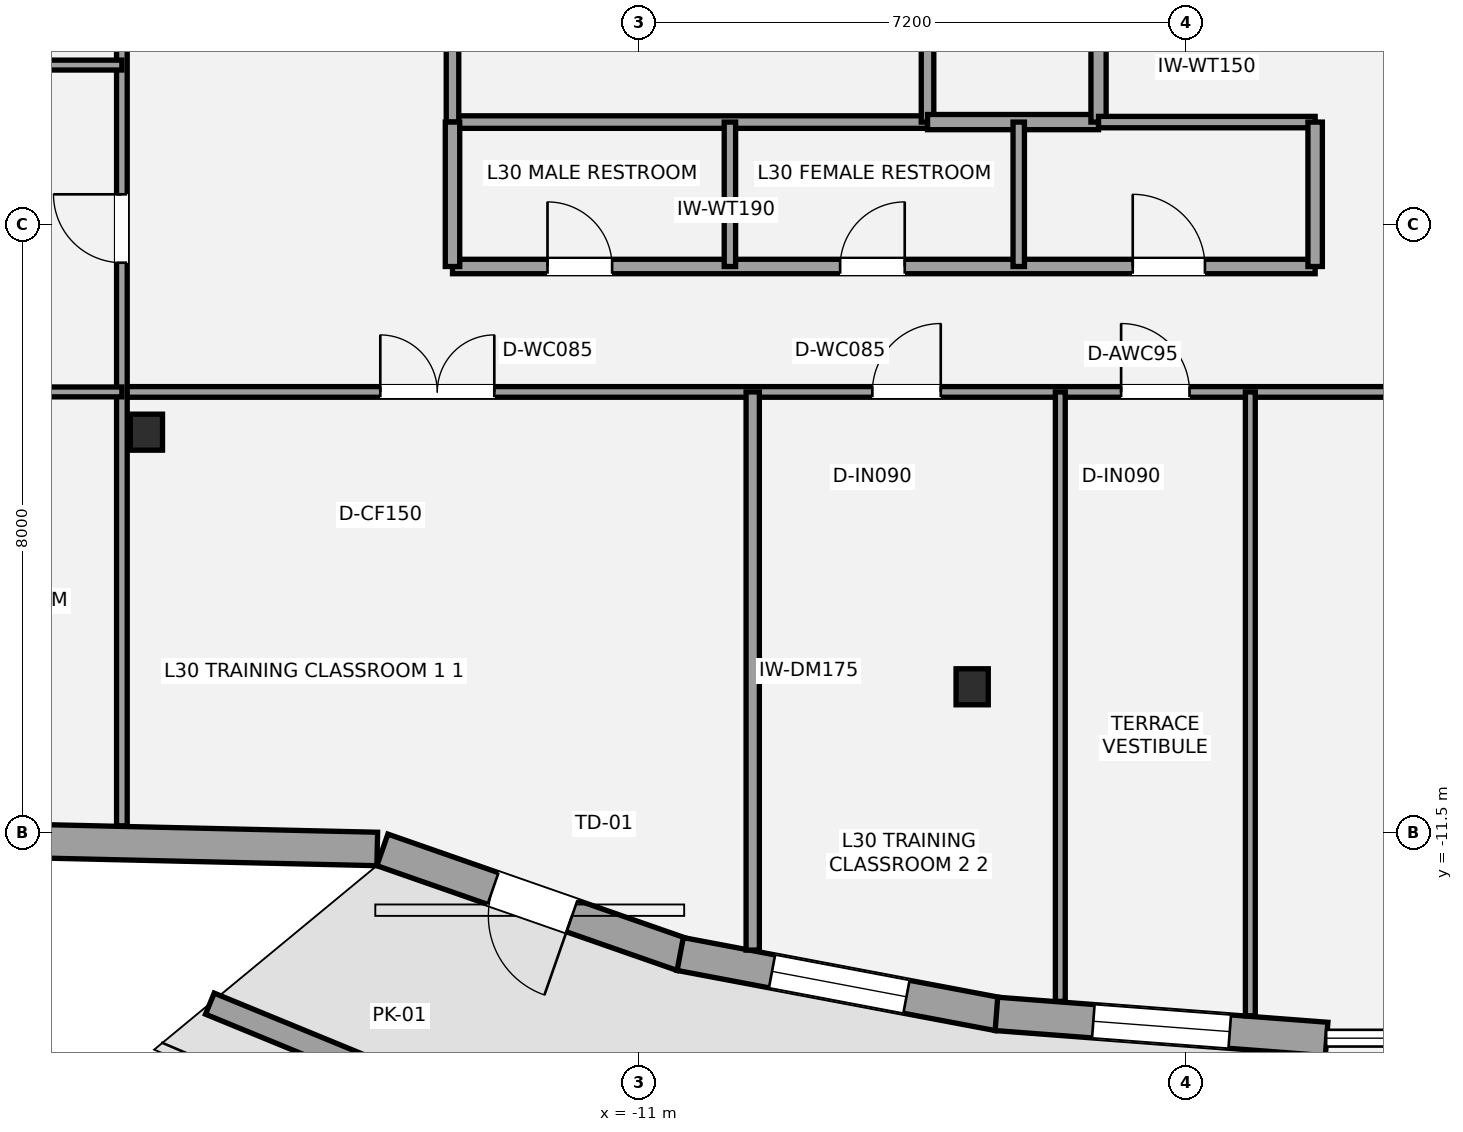
"""IFC4 building model, lengths in metres.
Left out: names, types, materials, properties, quantities, classifications, styles, units other than length and angle.
Written with IfcOpenShell. Run it as: python <this file> out.ifc"""

import sys

from ifc_helpers import new_model, si_unit, direction, frame, frame_2d, origin, origin_2d, place, context, subcontext, project, spatial, rectangle, i_section, extrude, element, fill, save


model = new_model("IFC4")
c1 = context("Model", 3, precision=1e-05, world=origin(), true_north=direction((0.0, 1.0)))
c2 = subcontext(c1, "Body", "Model", "MODEL_VIEW")
j1 = project(units=[si_unit("LENGTHUNIT", "METRE"), si_unit("PLANEANGLEUNIT", "RADIAN")], contexts=[c1])
p1 = place(None, origin())
s1 = spatial("IfcSite", under=j1, at=p1, CompositionType="ELEMENT")
p2 = place(p1, origin())
s2 = spatial("IfcBuilding", under=s1, at=p2, CompositionType="ELEMENT")
p3 = place(p2, frame((0.0, 0.0, 114.1)))
s3 = spatial("IfcBuildingStorey", under=s2, at=p3, CompositionType="ELEMENT", Elevation=114.1)
for number, where, z_axis, x_axis in (
    (1, (-17.477, -6.229, 0.0), (0.0, 0.0, 1.0), (1.0, 0.0, 0.0)),
    (2, (-6.613, -9.579, 0.0), (0.0, 0.0, 1.0), (1.0, 0.0, 0.0)),
):
    element("IfcColumn", number, at=place(p3, frame(where, z_axis=z_axis, x_axis=x_axis)), inside=s3, PredefinedType="COLUMN", context=c2, shape_type="SweptSolid", body=[
        extrude(i_section(OverallWidth=0.424, OverallDepth=0.474, WebThickness=0.048, FlangeThickness=0.077, at=origin_2d()), origin(), (0.0, 0.0, 1.0), 3.5),
    ])
p4 = place(p3, frame((-14.44, -11.713, 0.0), z_axis=(0.0, 0.0, 1.0), x_axis=(-0.999739488543, 0.022824439704, 0.0)))
e3 = element("IfcWall", 3, at=p4, inside=s3, PredefinedType="STANDARD", context=c2, shape_type="SweptSolid", body=[
    extrude(rectangle(XDim=6.728, YDim=0.44, at=frame_2d((3.364, 0.0))), origin(), (0.0, 0.0, 1.0), 2.532),
])
p5 = place(p3, frame((-10.423, -13.104, 0.0), z_axis=(0.0, 0.0, 1.0), x_axis=(-0.944167257662, 0.329466522668, 0.0)))
e4 = element("IfcWall", 4, at=p5, inside=s3, PredefinedType="STANDARD", context=c2, shape_type="SweptSolid", body=[
    extrude(rectangle(XDim=4.184, YDim=0.44, at=frame_2d((2.092, 0.0))), origin(), (0.0, 0.0, 1.0), 2.532),
])
p6 = place(p5, frame((1.542, 0.0, 0.0)))
e5 = element("IfcOpeningElement", 5, at=p6, cuts=e4, PredefinedType="OPENING", context=c2, shape_type="SweptSolid", body=[
    extrude(rectangle(XDim=1.1, YDim=2.15, at=frame_2d((0.55, 1.075))), frame((0.0, 0.23, 0.0), z_axis=(0.0, -1.0, 0.0), x_axis=(1.0, 0.0, 0.0)), (0.0, 0.0, 1.0), 0.46),
])
p7 = place(p3, frame((-6.269, -13.886, 0.0), z_axis=(0.0, 0.0, 1.0), x_axis=(-0.982602489318, 0.185721156539, 0.0)))
e6 = element("IfcWall", 6, at=p7, inside=s3, PredefinedType="STANDARD", context=c2, shape_type="SweptSolid", body=[
    extrude(rectangle(XDim=4.259, YDim=0.44, at=frame_2d((2.13, 0.0))), origin(), (0.0, 0.0, 1.0), 2.532),
])
p8 = place(p7, frame((1.229, 0.0, 0.65)))
e7 = element("IfcOpeningElement", 7, at=p8, cuts=e6, PredefinedType="OPENING", context=c2, shape_type="SweptSolid", body=[
    extrude(rectangle(XDim=1.8, YDim=1.7, at=frame_2d((0.9, 0.85))), frame((0.0, 0.23, 0.0), z_axis=(0.0, -1.0, 0.0), x_axis=(1.0, 0.0, 0.0)), (0.0, 0.0, 1.0), 0.46),
])
p9 = place(p3, frame((-1.949, -14.213, 0.0), z_axis=(0.0, 0.0, 1.0), x_axis=(-0.997130139105, 0.075706576258, 0.0)))
e8 = element("IfcWall", 8, at=p9, inside=s3, PredefinedType="STANDARD", context=c2, shape_type="SweptSolid", body=[
    extrude(rectangle(XDim=4.357, YDim=0.44, at=frame_2d((2.178, 0.0))), origin(), (0.0, 0.0, 1.0), 2.532),
])
p10 = place(p9, frame((1.278, 0.0, 0.65)))
e9 = element("IfcOpeningElement", 9, at=p10, cuts=e8, PredefinedType="OPENING", context=c2, shape_type="SweptSolid", body=[
    extrude(rectangle(XDim=1.8, YDim=1.7, at=frame_2d((0.9, 0.85))), frame((0.0, 0.23, 0.0), z_axis=(0.0, -1.0, 0.0), x_axis=(1.0, 0.0, 0.0)), (0.0, 0.0, 1.0), 0.46),
])
p11 = place(p3, frame((-16.643, -13.748, 0.0), z_axis=(0.0, 0.0, 1.0), x_axis=(0.924939291397, -0.380114860576, 0.0)))
e10 = element("IfcWall", 10, at=p11, inside=s3, PredefinedType="PARAPET", context=c2, shape_type="SweptSolid", body=[
    extrude(rectangle(XDim=4.739, YDim=0.3, at=frame_2d((2.369, 0.0))), origin(), (0.0, 0.0, 1.0), 0.45),
])
p12 = place(p3, frame((-13.45, -2.15, 0.0), z_axis=(0.0, 0.0, 1.0), x_axis=(1.0, 0.0, 0.0)))
e11 = element("IfcWall", 11, at=p12, inside=s3, PredefinedType="PARTITIONING", context=c2, shape_type="SweptSolid", body=[
    extrude(rectangle(XDim=6.25, YDim=0.165, at=frame_2d((3.125, 0.0))), origin(), (0.0, 0.0, 1.0), 3.31),
])
p13 = place(p3, frame((-13.45, -2.15, 0.0), z_axis=(0.0, 0.0, 1.0), x_axis=(0.0, 1.0, 0.0)))
e12 = element("IfcWall", 12, at=p13, inside=s3, PredefinedType="PARTITIONING", context=c2, shape_type="SweptSolid", body=[
    extrude(rectangle(XDim=3.3, YDim=0.165, at=frame_2d((1.65, 0.0))), origin(), (0.0, 0.0, 1.0), 2.763),
])
p14 = place(p13, frame((1.15, 0.0, 0.0)))
e13 = element("IfcOpeningElement", 13, at=p14, cuts=e12, PredefinedType="OPENING", context=c2, shape_type="SweptSolid", body=[
    extrude(rectangle(XDim=1.05, YDim=2.15, at=frame_2d((0.525, 1.075))), frame((0.0, 0.093, 0.0), z_axis=(0.0, -1.0, 0.0), x_axis=(1.0, 0.0, 0.0)), (0.0, 0.0, 1.0), 0.185),
])
p15 = place(p3, frame((-7.2, -2.15, 0.0), z_axis=(0.0, 0.0, 1.0), x_axis=(0.0, 1.0, 0.0)))
e14 = element("IfcWall", 14, at=p15, inside=s3, PredefinedType="PARTITIONING", context=c2, shape_type="SweptSolid", body=[
    extrude(rectangle(XDim=3.3, YDim=0.165, at=frame_2d((1.65, 0.0))), origin(), (0.0, 0.0, 1.0), 3.31),
])
p16 = place(p3, frame((-7.2, -2.15, 0.0), z_axis=(0.0, 0.0, 1.0), x_axis=(1.0, 0.0, 0.0)))
e15 = element("IfcWall", 15, at=p16, inside=s3, PredefinedType="SOLIDWALL", context=c2, shape_type="SweptSolid", body=[
    extrude(rectangle(XDim=2.25, YDim=0.2, at=frame_2d((1.125, 0.0))), origin(), (0.0, 0.0, 1.0), 3.31),
])
p17 = place(p3, frame((-4.95, -2.15, 0.0), z_axis=(0.0, 0.0, 1.0), x_axis=(0.0, 1.0, 0.0)))
e16 = element("IfcWall", 16, at=p17, inside=s3, PredefinedType="SOLIDWALL", context=c2, shape_type="SweptSolid", body=[
    extrude(rectangle(XDim=3.3, YDim=0.2, at=frame_2d((1.65, 0.0))), origin(), (0.0, 0.0, 1.0), 2.763),
])
p18 = place(p17, frame((0.95, 0.0, 0.0)))
e17 = element("IfcOpeningElement", 17, at=p18, cuts=e16, PredefinedType="OPENING", context=c2, shape_type="SweptSolid", body=[
    extrude(rectangle(XDim=0.75, YDim=2.1, at=frame_2d((0.375, 1.05))), frame((0.0, 0.11, 0.0), z_axis=(0.0, -1.0, 0.0), x_axis=(1.0, 0.0, 0.0)), (0.0, 0.0, 1.0), 0.22),
])
p19 = place(p3, frame((-13.45, -4.05, 0.0), z_axis=(0.0, 0.0, 1.0), x_axis=(1.0, 0.0, 0.0)))
e18 = element("IfcWall", 18, at=p19, inside=s3, PredefinedType="PLUMBINGWALL", context=c2, shape_type="SweptSolid", body=[
    extrude(rectangle(XDim=11.35, YDim=0.19, at=frame_2d((5.675, 0.0))), origin(), (0.0, 0.0, 1.0), 2.763),
])
p20 = place(p19, frame((1.25, 0.0, 0.0)))
e19 = element("IfcOpeningElement", 19, at=p20, cuts=e18, PredefinedType="OPENING", context=c2, shape_type="SweptSolid", body=[
    extrude(rectangle(XDim=0.85, YDim=2.1, at=frame_2d((0.425, 1.05))), frame((0.0, 0.105, 0.0), z_axis=(0.0, -1.0, 0.0), x_axis=(1.0, 0.0, 0.0)), (0.0, 0.0, 1.0), 0.21),
])
p21 = place(p19, frame((5.1, 0.0, 0.0)))
e20 = element("IfcOpeningElement", 20, at=p21, cuts=e18, PredefinedType="OPENING", context=c2, shape_type="SweptSolid", body=[
    extrude(rectangle(XDim=0.85, YDim=2.1, at=frame_2d((0.425, 1.05))), frame((0.0, 0.105, 0.0), z_axis=(0.0, -1.0, 0.0), x_axis=(1.0, 0.0, 0.0)), (0.0, 0.0, 1.0), 0.21),
])
p22 = place(p19, frame((8.95, 0.0, 0.0)))
e21 = element("IfcOpeningElement", 21, at=p22, cuts=e18, PredefinedType="OPENING", context=c2, shape_type="SweptSolid", body=[
    extrude(rectangle(XDim=0.95, YDim=2.15, at=frame_2d((0.475, 1.075))), frame((0.0, 0.105, 0.0), z_axis=(0.0, -1.0, 0.0), x_axis=(1.0, 0.0, 0.0)), (0.0, 0.0, 1.0), 0.21),
])
p23 = place(p3, frame((-4.95, -2.15, 0.0), z_axis=(0.0, 0.0, 1.0), x_axis=(1.0, 0.0, 0.0)))
e22 = element("IfcWall", 22, at=p23, inside=s3, PredefinedType="PLUMBINGWALL", context=c2, shape_type="SweptSolid", body=[
    extrude(rectangle(XDim=2.85, YDim=0.15, at=frame_2d((1.425, 0.0))), origin(), (0.0, 0.0, 1.0), 2.763),
])
p24 = place(p3, frame((-13.45, -4.05, 0.0), z_axis=(0.0, 0.0, 1.0), x_axis=(0.0, 1.0, 0.0)))
e23 = element("IfcWall", 23, at=p24, inside=s3, PredefinedType="PLUMBINGWALL", context=c2, shape_type="SweptSolid", body=[
    extrude(rectangle(XDim=1.9, YDim=0.19, at=frame_2d((0.95, 0.0))), origin(), (0.0, 0.0, 1.0), 2.763),
])
p25 = place(p3, frame((-2.1, -4.05, 0.0), z_axis=(0.0, 0.0, 1.0), x_axis=(0.0, 1.0, 0.0)))
e24 = element("IfcWall", 24, at=p25, inside=s3, PredefinedType="PLUMBINGWALL", context=c2, shape_type="SweptSolid", body=[
    extrude(rectangle(XDim=1.9, YDim=0.19, at=frame_2d((0.95, 0.0))), origin(), (0.0, 0.0, 1.0), 3.31),
])
p26 = place(p3, frame((-9.8, -4.05, 0.0), z_axis=(0.0, 0.0, 1.0), x_axis=(0.0, 1.0, 0.0)))
e25 = element("IfcWall", 25, at=p26, inside=s3, PredefinedType="PLUMBINGWALL", context=c2, shape_type="SweptSolid", body=[
    extrude(rectangle(XDim=1.9, YDim=0.15, at=frame_2d((0.95, 0.0))), origin(), (0.0, 0.0, 1.0), 3.31),
])
p27 = place(p3, frame((-6.0, -4.05, 0.0), z_axis=(0.0, 0.0, 1.0), x_axis=(0.0, 1.0, 0.0)))
e26 = element("IfcWall", 26, at=p27, inside=s3, PredefinedType="PLUMBINGWALL", context=c2, shape_type="SweptSolid", body=[
    extrude(rectangle(XDim=1.9, YDim=0.15, at=frame_2d((0.95, 0.0))), origin(), (0.0, 0.0, 1.0), 2.763),
])
p28 = place(p3, frame((-17.8, -5.7, 0.0), z_axis=(0.0, 0.0, 1.0), x_axis=(1.0, 0.0, 0.0)))
e27 = element("IfcWall", 27, at=p28, inside=s3, PredefinedType="PARTITIONING", context=c2, shape_type="SweptSolid", body=[
    extrude(rectangle(XDim=34.2, YDim=0.14, at=frame_2d((17.1, 0.0))), origin(), (0.0, 0.0, 1.0), 2.688),
])
p29 = place(p28, frame((3.4, 0.0, 0.0)))
e28 = element("IfcOpeningElement", 28, at=p29, cuts=e27, PredefinedType="OPENING", context=c2, shape_type="SweptSolid", body=[
    extrude(rectangle(XDim=1.5, YDim=2.15, at=frame_2d((0.75, 1.075))), frame((0.0, 0.08, 0.0), z_axis=(0.0, -1.0, 0.0), x_axis=(1.0, 0.0, 0.0)), (0.0, 0.0, 1.0), 0.16),
])
p30 = place(p28, frame((9.874, 0.0, 0.0)))
e29 = element("IfcOpeningElement", 29, at=p30, cuts=e27, PredefinedType="OPENING", context=c2, shape_type="SweptSolid", body=[
    extrude(rectangle(XDim=0.9, YDim=2.1, at=frame_2d((0.45, 1.05))), frame((0.0, 0.08, 0.0), z_axis=(0.0, -1.0, 0.0), x_axis=(1.0, 0.0, 0.0)), (0.0, 0.0, 1.0), 0.16),
])
p31 = place(p28, frame((13.147, 0.0, 0.0)))
e30 = element("IfcOpeningElement", 30, at=p31, cuts=e27, PredefinedType="OPENING", context=c2, shape_type="SweptSolid", body=[
    extrude(rectangle(XDim=0.9, YDim=2.1, at=frame_2d((0.45, 1.05))), frame((0.0, 0.08, 0.0), z_axis=(0.0, -1.0, 0.0), x_axis=(1.0, 0.0, 0.0)), (0.0, 0.0, 1.0), 0.16),
])
p32 = place(p28, frame((18.823, 0.0, 0.0)))
e31 = element("IfcOpeningElement", 31, at=p32, cuts=e27, PredefinedType="OPENING", context=c2, shape_type="SweptSolid", body=[
    extrude(rectangle(XDim=1.5, YDim=2.15, at=frame_2d((0.75, 1.075))), frame((0.0, 0.08, 0.0), z_axis=(0.0, -1.0, 0.0), x_axis=(1.0, 0.0, 0.0)), (0.0, 0.0, 1.0), 0.16),
])
p33 = place(p28, frame((28.5, 0.0, 0.0)))
e32 = element("IfcOpeningElement", 32, at=p33, cuts=e27, PredefinedType="OPENING", context=c2, shape_type="SweptSolid", body=[
    extrude(rectangle(XDim=1.5, YDim=2.15, at=frame_2d((0.75, 1.075))), frame((0.0, 0.08, 0.0), z_axis=(0.0, -1.0, 0.0), x_axis=(1.0, 0.0, 0.0)), (0.0, 0.0, 1.0), 0.16),
])
p34 = place(p3, frame((-17.8, -11.408, 0.0), z_axis=(0.0, 0.0, 1.0), x_axis=(0.0, 1.0, 0.0)))
e33 = element("IfcWall", 33, at=p34, inside=s3, PredefinedType="PARTITIONING", context=c2, shape_type="SweptSolid", body=[
    extrude(rectangle(XDim=18.958, YDim=0.14, at=frame_2d((9.479, 0.0))), origin(), (0.0, 0.0, 1.0), 2.688),
])
p35 = place(p34, frame((7.408, 0.0, 0.0)))
e34 = element("IfcOpeningElement", 34, at=p35, cuts=e33, PredefinedType="OPENING", context=c2, shape_type="SweptSolid", body=[
    extrude(rectangle(XDim=0.9, YDim=2.1, at=frame_2d((0.45, 1.05))), frame((0.0, 0.08, 0.0), z_axis=(0.0, -1.0, 0.0), x_axis=(1.0, 0.0, 0.0)), (0.0, 0.0, 1.0), 0.16),
])
p36 = place(p34, frame((11.858, 0.0, 0.0)))
e35 = element("IfcOpeningElement", 35, at=p36, cuts=e33, PredefinedType="OPENING", context=c2, shape_type="SweptSolid", body=[
    extrude(rectangle(XDim=0.9, YDim=2.1, at=frame_2d((0.45, 1.05))), frame((0.0, 0.08, 0.0), z_axis=(0.0, -1.0, 0.0), x_axis=(1.0, 0.0, 0.0)), (0.0, 0.0, 1.0), 0.16),
])
p37 = place(p34, frame((16.333, 0.0, 0.0)))
e36 = element("IfcOpeningElement", 36, at=p37, cuts=e33, PredefinedType="OPENING", context=c2, shape_type="SweptSolid", body=[
    extrude(rectangle(XDim=0.9, YDim=2.1, at=frame_2d((0.45, 1.05))), frame((0.0, 0.08, 0.0), z_axis=(0.0, -1.0, 0.0), x_axis=(1.0, 0.0, 0.0)), (0.0, 0.0, 1.0), 0.16),
])
p38 = place(p3, frame((-9.5, -13.043, 0.0), z_axis=(0.0, 0.0, 1.0), x_axis=(0.0, 1.0, 0.0)))
e37 = element("IfcWall", 37, at=p38, inside=s3, PredefinedType="PARTITIONING", context=c2, shape_type="SweptSolid", body=[
    extrude(rectangle(XDim=7.343, YDim=0.175, at=frame_2d((3.672, 0.0))), origin(), (0.0, 0.0, 1.0), 3.31),
])
p39 = place(p3, frame((-5.453, -13.718, 0.0), z_axis=(0.0, 0.0, 1.0), x_axis=(0.0, 1.0, 0.0)))
e38 = element("IfcWall", 38, at=p39, inside=s3, PredefinedType="PARTITIONING", context=c2, shape_type="SweptSolid", body=[
    extrude(rectangle(XDim=8.018, YDim=0.13, at=frame_2d((4.009, 0.0))), origin(), (0.0, 0.0, 1.0), 2.763),
])
p40 = place(p3, frame((-2.953, -13.908, 0.0), z_axis=(0.0, 0.0, 1.0), x_axis=(0.0, 1.0, 0.0)))
e39 = element("IfcWall", 39, at=p40, inside=s3, PredefinedType="PARTITIONING", context=c2, shape_type="SweptSolid", body=[
    extrude(rectangle(XDim=8.208, YDim=0.13, at=frame_2d((4.104, 0.0))), origin(), (0.0, 0.0, 1.0), 2.763),
])
p41 = place(p3, frame((-25.199, -5.7, 0.0), z_axis=(0.0, 0.0, 1.0), x_axis=(1.0, 0.0, 0.0)))
e40 = element("IfcWall", 40, at=p41, inside=s3, PredefinedType="PARTITIONING", context=c2, shape_type="SweptSolid", body=[
    extrude(rectangle(XDim=7.399, YDim=0.13, at=frame_2d((3.699, 0.0))), origin(), (0.0, 0.0, 1.0), 2.688),
])
p42 = place(p41, frame((0.51, 0.0, 0.0)))
e41 = element("IfcOpeningElement", 41, at=p42, cuts=e40, PredefinedType="OPENING", context=c2, shape_type="SweptSolid", body=[
    extrude(rectangle(XDim=0.9, YDim=2.1, at=frame_2d((0.45, 1.05))), frame((0.0, 0.075, 0.0), z_axis=(0.0, -1.0, 0.0), x_axis=(1.0, 0.0, 0.0)), (0.0, 0.0, 1.0), 0.15),
])
p43 = place(p3, frame((-26.372, -1.4, 0.0), z_axis=(0.0, 0.0, 1.0), x_axis=(1.0, 0.0, 0.0)))
e42 = element("IfcWall", 42, at=p43, inside=s3, PredefinedType="PARTITIONING", context=c2, shape_type="SweptSolid", body=[
    extrude(rectangle(XDim=8.572, YDim=0.13, at=frame_2d((4.286, 0.0))), origin(), (0.0, 0.0, 1.0), 2.763),
])
p44 = place(p6, origin())
e43 = element("IfcDoor", 43, at=p44, inside=s3, OperationType="SINGLE_SWING_LEFT", PredefinedType="DOOR", context=c2, shape_type="SweptSolid", body=[
    extrude(rectangle(XDim=1.1, YDim=2.15, at=frame_2d((0.55, 1.075))), frame((0.0, 0.025, 0.0), z_axis=(0.0, -1.0, 0.0), x_axis=(1.0, 0.0, 0.0)), (0.0, 0.0, 1.0), 0.05),
])
fill(e5, e43)
p45 = place(p8, origin())
e44 = element("IfcWindow", 44, at=p45, inside=s3, PartitioningType="SINGLE_PANEL", PredefinedType="WINDOW", context=c2, shape_type="SweptSolid", body=[
    extrude(rectangle(XDim=1.8, YDim=1.7, at=frame_2d((0.9, 0.85))), frame((0.0, -0.01, 0.0), z_axis=(0.0, -1.0, 0.0), x_axis=(1.0, 0.0, 0.0)), (0.0, 0.0, 1.0), 0.06),
])
fill(e7, e44)
p46 = place(p10, origin())
e45 = element("IfcWindow", 45, at=p46, inside=s3, PartitioningType="SINGLE_PANEL", PredefinedType="WINDOW", context=c2, shape_type="SweptSolid", body=[
    extrude(rectangle(XDim=1.8, YDim=1.7, at=frame_2d((0.9, 0.85))), frame((0.0, -0.01, 0.0), z_axis=(0.0, -1.0, 0.0), x_axis=(1.0, 0.0, 0.0)), (0.0, 0.0, 1.0), 0.06),
])
fill(e9, e45)
p47 = place(p20, origin())
e46 = element("IfcDoor", 46, at=p47, inside=s3, OperationType="SINGLE_SWING_LEFT", PredefinedType="DOOR", context=c2, shape_type="SweptSolid", body=[
    extrude(rectangle(XDim=0.85, YDim=2.1, at=frame_2d((0.425, 1.05))), frame((0.0, 0.025, 0.0), z_axis=(0.0, -1.0, 0.0), x_axis=(1.0, 0.0, 0.0)), (0.0, 0.0, 1.0), 0.05),
])
fill(e19, e46)
p48 = place(p21, origin())
e47 = element("IfcDoor", 47, at=p48, inside=s3, OperationType="SINGLE_SWING_RIGHT", PredefinedType="DOOR", context=c2, shape_type="SweptSolid", body=[
    extrude(rectangle(XDim=0.85, YDim=2.1, at=frame_2d((0.425, 1.05))), frame((0.0, 0.025, 0.0), z_axis=(0.0, -1.0, 0.0), x_axis=(1.0, 0.0, 0.0)), (0.0, 0.0, 1.0), 0.05),
])
fill(e20, e47)
p49 = place(p22, origin())
e48 = element("IfcDoor", 48, at=p49, inside=s3, OperationType="SINGLE_SWING_LEFT", PredefinedType="DOOR", context=c2, shape_type="SweptSolid", body=[
    extrude(rectangle(XDim=0.95, YDim=2.15, at=frame_2d((0.475, 1.075))), frame((0.0, 0.025, 0.0), z_axis=(0.0, -1.0, 0.0), x_axis=(1.0, 0.0, 0.0)), (0.0, 0.0, 1.0), 0.05),
])
fill(e21, e48)
p50 = place(p29, origin())
e49 = element("IfcDoor", 49, at=p50, inside=s3, OperationType="DOUBLE_DOOR_SINGLE_SWING", PredefinedType="DOOR", context=c2, shape_type="SweptSolid", body=[
    extrude(rectangle(XDim=1.5, YDim=2.15, at=frame_2d((0.75, 1.075))), frame((0.0, 0.025, 0.0), z_axis=(0.0, -1.0, 0.0), x_axis=(1.0, 0.0, 0.0)), (0.0, 0.0, 1.0), 0.05),
])
fill(e28, e49)
p51 = place(p30, origin())
e50 = element("IfcDoor", 50, at=p51, inside=s3, OperationType="SINGLE_SWING_RIGHT", PredefinedType="DOOR", context=c2, shape_type="SweptSolid", body=[
    extrude(rectangle(XDim=0.9, YDim=2.1, at=frame_2d((0.45, 1.05))), frame((0.0, 0.025, 0.0), z_axis=(0.0, -1.0, 0.0), x_axis=(1.0, 0.0, 0.0)), (0.0, 0.0, 1.0), 0.05),
])
fill(e29, e50)
p52 = place(p31, origin())
e51 = element("IfcDoor", 51, at=p52, inside=s3, OperationType="SINGLE_SWING_LEFT", PredefinedType="DOOR", context=c2, shape_type="SweptSolid", body=[
    extrude(rectangle(XDim=0.9, YDim=2.1, at=frame_2d((0.45, 1.05))), frame((0.0, 0.025, 0.0), z_axis=(0.0, -1.0, 0.0), x_axis=(1.0, 0.0, 0.0)), (0.0, 0.0, 1.0), 0.05),
])
fill(e30, e51)
p53 = place(p35, origin())
e52 = element("IfcDoor", 52, at=p53, inside=s3, OperationType="SINGLE_SWING_RIGHT", PredefinedType="DOOR", context=c2, shape_type="SweptSolid", body=[
    extrude(rectangle(XDim=0.9, YDim=2.1, at=frame_2d((0.45, 1.05))), frame((0.0, 0.025, 0.0), z_axis=(0.0, -1.0, 0.0), x_axis=(1.0, 0.0, 0.0)), (0.0, 0.0, 1.0), 0.05),
])
fill(e34, e52)
save(model, sys.argv[1])
